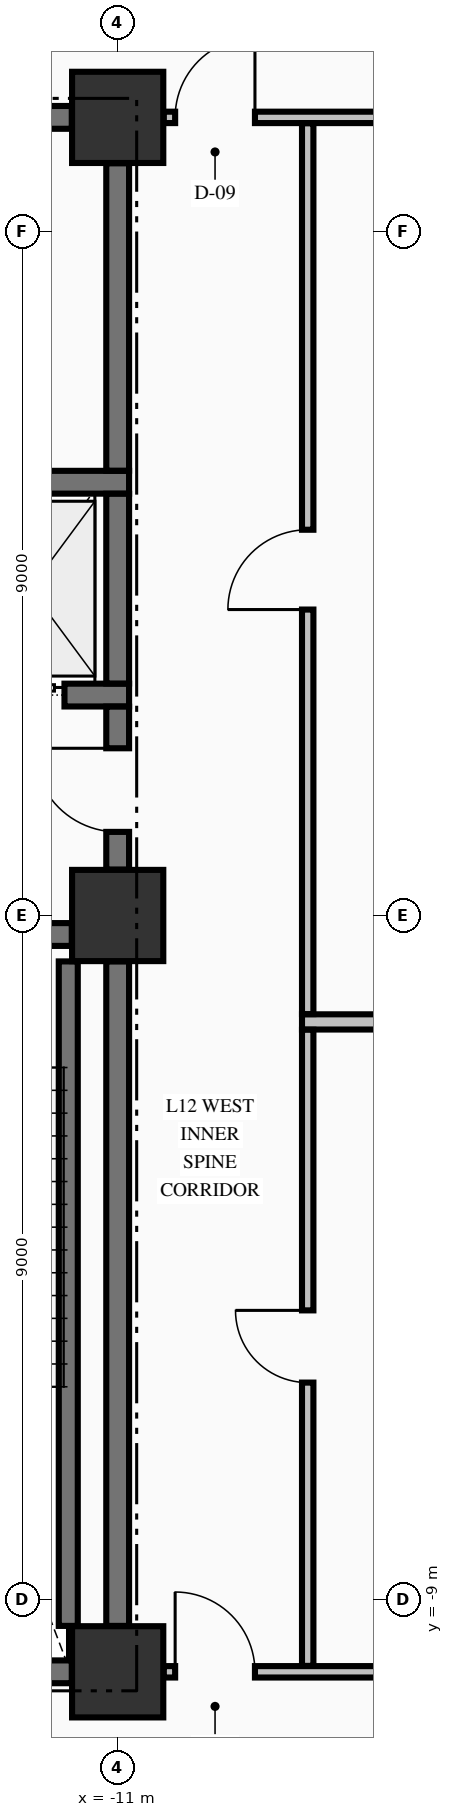
"""IFC4 building model, lengths in metres.
Left out: names, types, materials, properties, quantities, classifications, styles, units other than length and angle.
Written with IfcOpenShell. Run it as: python <this file> out.ifc"""

import sys

from ifc_helpers import new_model, si_unit, direction, frame, frame_2d, origin, origin_2d, place, context, subcontext, project, spatial, rectangle, extrude, element, fill, save


model = new_model("IFC4")
c1 = context("Model", 3, precision=1e-05, world=origin(), true_north=direction((0.0, 1.0)))
c2 = subcontext(c1, "Body", "Model", "MODEL_VIEW")
j1 = project(units=[si_unit("LENGTHUNIT", "METRE"), si_unit("PLANEANGLEUNIT", "RADIAN")], contexts=[c1])
p1 = place(None, origin())
s1 = spatial("IfcSite", under=j1, at=p1, CompositionType="ELEMENT")
p2 = place(p1, origin())
s2 = spatial("IfcBuilding", under=s1, at=p2, CompositionType="ELEMENT")
p3 = place(p2, frame((0.0, 0.0, 52.19)))
s3 = spatial("IfcBuildingStorey", under=s2, at=p3, CompositionType="ELEMENT", Elevation=52.19)
for number, where, z_axis, x_axis in (
    (1, (-11.0, -9.95, -0.425), (0.0, 0.0, 1.0), (1.0, 0.0, 0.0)),
    (2, (-11.0, 0.0, -0.425), (0.0, 0.0, 1.0), (1.0, 0.0, 0.0)),
    (3, (-11.0, 10.5, -0.425), (0.0, 0.0, 1.0), (1.0, 0.0, 0.0)),
):
    element("IfcColumn", number, at=place(p3, frame(where, z_axis=z_axis, x_axis=x_axis)), inside=s3, PredefinedType="COLUMN", context=c2, shape_type="SweptSolid", body=[
        extrude(rectangle(XDim=1.2, YDim=1.2, at=origin_2d()), origin(), (0.0, 0.0, 1.0), 5.0),
    ])
p4 = place(p3, frame((-14.7, -9.95, 0.0), z_axis=(0.0, 0.0, 1.0), x_axis=(1.0, 0.0, 0.0)))
e4 = element("IfcWall", 4, at=p4, inside=s3, PredefinedType="SHEAR", context=c2, shape_type="SweptSolid", body=[
    extrude(rectangle(XDim=3.096, YDim=0.3, at=frame_2d((1.548, 0.0))), origin(), (0.0, 0.0, 1.0), 4.575),
])
p5 = place(p3, frame((-19.396, -0.25, 0.0), z_axis=(0.0, 0.0, 1.0), x_axis=(1.0, 0.0, 0.0)))
e5 = element("IfcWall", 5, at=p5, inside=s3, PredefinedType="SHEAR", context=c2, shape_type="SweptSolid", body=[
    extrude(rectangle(XDim=7.792, YDim=0.3, at=frame_2d((3.896, 0.0))), origin(), (0.0, 0.0, 1.0), 4.575),
])
p6 = place(p5, frame((5.696, 0.0, 0.0)))
e6 = element("IfcOpeningElement", 6, at=p6, cuts=e5, PredefinedType="OPENING", context=c2, shape_type="SweptSolid", body=[
    extrude(rectangle(XDim=1.1, YDim=2.15, at=frame_2d((0.55, 1.075))), frame((0.0, 0.16, 0.0), z_axis=(0.0, -1.0, 0.0), x_axis=(1.0, 0.0, 0.0)), (0.0, 0.0, 1.0), 0.32),
])
p7 = place(p3, frame((-14.875, 2.9, 0.0), z_axis=(0.0, 0.0, 1.0), x_axis=(1.0, 0.0, 0.0)))
e7 = element("IfcWall", 7, at=p7, inside=s3, PredefinedType="SHEAR", context=c2, shape_type="SweptSolid", body=[
    extrude(rectangle(XDim=4.025, YDim=0.3, at=frame_2d((2.012, 0.0))), origin(), (0.0, 0.0, 1.0), 4.575),
])
p8 = place(p7, frame((2.075, 0.0, 0.0)))
e8 = element("IfcOpeningElement", 8, at=p8, cuts=e7, PredefinedType="OPENING", context=c2, shape_type="SweptSolid", body=[
    extrude(rectangle(XDim=1.1, YDim=2.2, at=frame_2d((0.55, 1.1))), frame((0.0, 0.16, 0.0), z_axis=(0.0, -1.0, 0.0), x_axis=(1.0, 0.0, 0.0)), (0.0, 0.0, 1.0), 0.32),
])
p9 = place(p3, frame((-14.875, 5.7, 0.0), z_axis=(0.0, 0.0, 1.0), x_axis=(1.0, 0.0, 0.0)))
e9 = element("IfcWall", 9, at=p9, inside=s3, PredefinedType="SHEAR", context=c2, shape_type="SweptSolid", body=[
    extrude(rectangle(XDim=4.025, YDim=0.3, at=frame_2d((2.012, 0.0))), origin(), (0.0, 0.0, 1.0), 4.575),
])
p10 = place(p3, frame((-14.7, 10.5, 0.0), z_axis=(0.0, 0.0, 1.0), x_axis=(1.0, 0.0, 0.0)))
e10 = element("IfcWall", 10, at=p10, inside=s3, PredefinedType="SHEAR", context=c2, shape_type="SweptSolid", body=[
    extrude(rectangle(XDim=3.096, YDim=0.3, at=frame_2d((1.548, 0.0))), origin(), (0.0, 0.0, 1.0), 4.575),
])
p11 = place(p10, frame((0.775, 0.0, 0.0)))
e11 = element("IfcOpeningElement", 11, at=p11, cuts=e10, PredefinedType="OPENING", context=c2, shape_type="SweptSolid", body=[
    extrude(rectangle(XDim=0.95, YDim=2.15, at=frame_2d((0.475, 1.075))), frame((0.0, 0.16, 0.0), z_axis=(0.0, -1.0, 0.0), x_axis=(1.0, 0.0, 0.0)), (0.0, 0.0, 1.0), 0.32),
])
p12 = place(p3, frame((-10.394, -9.95, 0.0), z_axis=(0.0, 0.0, 1.0), x_axis=(1.0, 0.0, 0.0)))
e12 = element("IfcWall", 12, at=p12, inside=s3, PredefinedType="PARTITIONING", context=c2, shape_type="SweptSolid", body=[
    extrude(rectangle(XDim=20.788, YDim=0.15, at=frame_2d((10.394, 0.0))), origin(), (0.0, 0.0, 1.0), 4.575),
])
p13 = place(p12, frame((0.15, 0.0, 0.0)))
e13 = element("IfcOpeningElement", 13, at=p13, cuts=e12, PredefinedType="OPENING", context=c2, shape_type="SweptSolid", body=[
    extrude(rectangle(XDim=1.05, YDim=2.15, at=frame_2d((0.525, 1.075))), frame((0.0, 0.085, 0.0), z_axis=(0.0, -1.0, 0.0), x_axis=(1.0, 0.0, 0.0)), (0.0, 0.0, 1.0), 0.17),
])
p14 = place(p12, frame((19.588, 0.0, 0.0)))
e14 = element("IfcOpeningElement", 14, at=p14, cuts=e12, PredefinedType="OPENING", context=c2, shape_type="SweptSolid", body=[
    extrude(rectangle(XDim=1.05, YDim=2.15, at=frame_2d((0.525, 1.075))), frame((0.0, 0.085, 0.0), z_axis=(0.0, -1.0, 0.0), x_axis=(1.0, 0.0, 0.0)), (0.0, 0.0, 1.0), 0.17),
])
p15 = place(p12, frame((12.669, 0.0, 0.0)))
e15 = element("IfcOpeningElement", 15, at=p15, cuts=e12, PredefinedType="OPENING", context=c2, shape_type="SweptSolid", body=[
    extrude(rectangle(XDim=0.95, YDim=2.15, at=frame_2d((0.475, 1.075))), frame((0.0, 0.085, 0.0), z_axis=(0.0, -1.0, 0.0), x_axis=(1.0, 0.0, 0.0)), (0.0, 0.0, 1.0), 0.17),
])
p16 = place(p3, frame((-8.575, -1.4, 0.0), z_axis=(0.0, 0.0, 1.0), x_axis=(1.0, 0.0, 0.0)))
e16 = element("IfcWall", 16, at=p16, inside=s3, PredefinedType="PARTITIONING", context=c2, shape_type="SweptSolid", body=[
    extrude(rectangle(XDim=8.675, YDim=0.2, at=frame_2d((4.337, 0.0))), origin(), (0.0, 0.0, 1.0), 4.575),
])
p17 = place(p3, frame((-10.394, 10.5, 0.0), z_axis=(0.0, 0.0, 1.0), x_axis=(1.0, 0.0, 0.0)))
e17 = element("IfcWall", 17, at=p17, inside=s3, PredefinedType="PARTITIONING", context=c2, shape_type="SweptSolid", body=[
    extrude(rectangle(XDim=20.788, YDim=0.15, at=frame_2d((10.394, 0.0))), origin(), (0.0, 0.0, 1.0), 4.575),
])
p18 = place(p17, frame((0.15, 0.0, 0.0)))
e18 = element("IfcOpeningElement", 18, at=p18, cuts=e17, PredefinedType="OPENING", context=c2, shape_type="SweptSolid", body=[
    extrude(rectangle(XDim=1.05, YDim=2.15, at=frame_2d((0.525, 1.075))), frame((0.0, 0.085, 0.0), z_axis=(0.0, -1.0, 0.0), x_axis=(1.0, 0.0, 0.0)), (0.0, 0.0, 1.0), 0.17),
])
p19 = place(p17, frame((19.588, 0.0, 0.0)))
e19 = element("IfcOpeningElement", 19, at=p19, cuts=e17, PredefinedType="OPENING", context=c2, shape_type="SweptSolid", body=[
    extrude(rectangle(XDim=1.05, YDim=2.15, at=frame_2d((0.525, 1.075))), frame((0.0, 0.085, 0.0), z_axis=(0.0, -1.0, 0.0), x_axis=(1.0, 0.0, 0.0)), (0.0, 0.0, 1.0), 0.17),
])
p20 = place(p3, frame((-11.65, -9.346, 0.0), z_axis=(0.0, 0.0, 1.0), x_axis=(0.0, 1.0, 0.0)))
e20 = element("IfcWall", 20, at=p20, inside=s3, PredefinedType="SOLIDWALL", context=c2, shape_type="SweptSolid", body=[
    extrude(rectangle(XDim=8.742, YDim=0.25, at=frame_2d((4.371, 0.0))), origin(), (0.0, 0.0, 1.0), 4.575),
])
p21 = place(p3, frame((-11.0, -9.346, 0.0), z_axis=(0.0, 0.0, 1.0), x_axis=(0.0, 1.0, 0.0)))
e21 = element("IfcWall", 21, at=p21, inside=s3, PredefinedType="SHEAR", context=c2, shape_type="SweptSolid", body=[
    extrude(rectangle(XDim=8.742, YDim=0.3, at=frame_2d((4.371, 0.0))), origin(), (0.0, 0.0, 1.0), 4.575),
])
p22 = place(p3, frame((-11.0, 0.604, 0.0), z_axis=(0.0, 0.0, 1.0), x_axis=(0.0, 1.0, 0.0)))
e22 = element("IfcWall", 22, at=p22, inside=s3, PredefinedType="SHEAR", context=c2, shape_type="SweptSolid", body=[
    extrude(rectangle(XDim=2.144, YDim=0.3, at=frame_2d((1.072, 0.0))), origin(), (0.0, 0.0, 1.0), 4.575),
])
p23 = place(p22, frame((0.496, 0.0, 0.0)))
e23 = element("IfcOpeningElement", 23, at=p23, cuts=e22, PredefinedType="OPENING", context=c2, shape_type="SweptSolid", body=[
    extrude(rectangle(XDim=1.1, YDim=2.15, at=frame_2d((0.55, 1.075))), frame((0.0, 0.16, 0.0), z_axis=(0.0, -1.0, 0.0), x_axis=(1.0, 0.0, 0.0)), (0.0, 0.0, 1.0), 0.32),
])
p24 = place(p3, frame((-11.0, 3.052, 0.0), z_axis=(0.0, 0.0, 1.0), x_axis=(0.0, 1.0, 0.0)))
e24 = element("IfcWall", 24, at=p24, inside=s3, PredefinedType="SHEAR", context=c2, shape_type="SweptSolid", body=[
    extrude(rectangle(XDim=2.496, YDim=0.3, at=frame_2d((1.248, 0.0))), origin(), (0.0, 0.0, 1.0), 4.575),
])
p25 = place(p3, frame((-11.0, 5.852, 0.0), z_axis=(0.0, 0.0, 1.0), x_axis=(0.0, 1.0, 0.0)))
e25 = element("IfcWall", 25, at=p25, inside=s3, PredefinedType="SHEAR", context=c2, shape_type="SweptSolid", body=[
    extrude(rectangle(XDim=4.044, YDim=0.3, at=frame_2d((2.022, 0.0))), origin(), (0.0, 0.0, 1.0), 4.575),
])
p26 = place(p3, frame((-8.5, -9.872, 0.0), z_axis=(0.0, 0.0, 1.0), x_axis=(0.0, 1.0, 0.0)))
e26 = element("IfcWall", 26, at=p26, inside=s3, PredefinedType="PARTITIONING", context=c2, shape_type="SweptSolid", body=[
    extrude(rectangle(XDim=8.369, YDim=0.15, at=frame_2d((4.185, 0.0))), origin(), (0.0, 0.0, 1.0), 4.575),
])
p27 = place(p26, frame((3.727, 0.0, 0.0)))
e27 = element("IfcOpeningElement", 27, at=p27, cuts=e26, PredefinedType="OPENING", context=c2, shape_type="SweptSolid", body=[
    extrude(rectangle(XDim=0.95, YDim=2.15, at=frame_2d((0.475, 1.075))), frame((0.0, 0.085, 0.0), z_axis=(0.0, -1.0, 0.0), x_axis=(1.0, 0.0, 0.0)), (0.0, 0.0, 1.0), 0.17),
])
p28 = place(p3, frame((-8.5, -1.297, 0.0), z_axis=(0.0, 0.0, 1.0), x_axis=(0.0, 1.0, 0.0)))
e28 = element("IfcWall", 28, at=p28, inside=s3, PredefinedType="PARTITIONING", context=c2, shape_type="SweptSolid", body=[
    extrude(rectangle(XDim=11.719, YDim=0.15, at=frame_2d((5.86, 0.0))), origin(), (0.0, 0.0, 1.0), 4.575),
])
p29 = place(p28, frame((5.322, 0.0, 0.0)))
e29 = element("IfcOpeningElement", 29, at=p29, cuts=e28, PredefinedType="OPENING", context=c2, shape_type="SweptSolid", body=[
    extrude(rectangle(XDim=1.05, YDim=2.15, at=frame_2d((0.525, 1.075))), frame((0.0, 0.085, 0.0), z_axis=(0.0, -1.0, 0.0), x_axis=(1.0, 0.0, 0.0)), (0.0, 0.0, 1.0), 0.17),
])
p30 = place(p23, origin())
e30 = element("IfcDoor", 30, at=p30, inside=s3, OperationType="SINGLE_SWING_RIGHT", PredefinedType="DOOR", context=c2, shape_type="SweptSolid", body=[
    extrude(rectangle(XDim=1.1, YDim=2.15, at=frame_2d((0.55, 1.075))), frame((0.0, 0.025, 0.0), z_axis=(0.0, -1.0, 0.0), x_axis=(1.0, 0.0, 0.0)), (0.0, 0.0, 1.0), 0.05),
])
fill(e23, e30)
p31 = place(p8, origin())
e31 = element("IfcDoor", 31, at=p31, inside=s3, OperationType="SLIDING_TO_LEFT", PredefinedType="DOOR", context=c2, shape_type="SweptSolid", body=[
    extrude(rectangle(XDim=1.1, YDim=2.2, at=frame_2d((0.55, 1.1))), frame((0.0, 0.025, 0.0), z_axis=(0.0, -1.0, 0.0), x_axis=(1.0, 0.0, 0.0)), (0.0, 0.0, 1.0), 0.05),
])
fill(e8, e31)
p32 = place(p18, origin())
e32 = element("IfcDoor", 32, at=p32, inside=s3, OperationType="SINGLE_SWING_RIGHT", PredefinedType="DOOR", context=c2, shape_type="SweptSolid", body=[
    extrude(rectangle(XDim=1.05, YDim=2.15, at=frame_2d((0.525, 1.075))), frame((0.0, 0.025, 0.0), z_axis=(0.0, -1.0, 0.0), x_axis=(1.0, 0.0, 0.0)), (0.0, 0.0, 1.0), 0.05),
])
fill(e18, e32)
p33 = place(p13, origin())
e33 = element("IfcDoor", 33, at=p33, inside=s3, OperationType="SINGLE_SWING_LEFT", PredefinedType="DOOR", context=c2, shape_type="SweptSolid", body=[
    extrude(rectangle(XDim=1.05, YDim=2.15, at=frame_2d((0.525, 1.075))), frame((0.0, 0.025, 0.0), z_axis=(0.0, -1.0, 0.0), x_axis=(1.0, 0.0, 0.0)), (0.0, 0.0, 1.0), 0.05),
])
fill(e13, e33)
p34 = place(p29, origin())
e34 = element("IfcDoor", 34, at=p34, inside=s3, OperationType="SINGLE_SWING_LEFT", PredefinedType="DOOR", context=c2, shape_type="SweptSolid", body=[
    extrude(rectangle(XDim=1.05, YDim=2.15, at=frame_2d((0.525, 1.075))), frame((0.0, 0.025, 0.0), z_axis=(0.0, -1.0, 0.0), x_axis=(1.0, 0.0, 0.0)), (0.0, 0.0, 1.0), 0.05),
])
fill(e29, e34)
p35 = place(p27, origin())
e35 = element("IfcDoor", 35, at=p35, inside=s3, OperationType="SINGLE_SWING_RIGHT", PredefinedType="DOOR", context=c2, shape_type="SweptSolid", body=[
    extrude(rectangle(XDim=0.95, YDim=2.15, at=frame_2d((0.475, 1.075))), frame((0.0, 0.025, 0.0), z_axis=(0.0, -1.0, 0.0), x_axis=(1.0, 0.0, 0.0)), (0.0, 0.0, 1.0), 0.05),
])
fill(e27, e35)
save(model, sys.argv[1])
